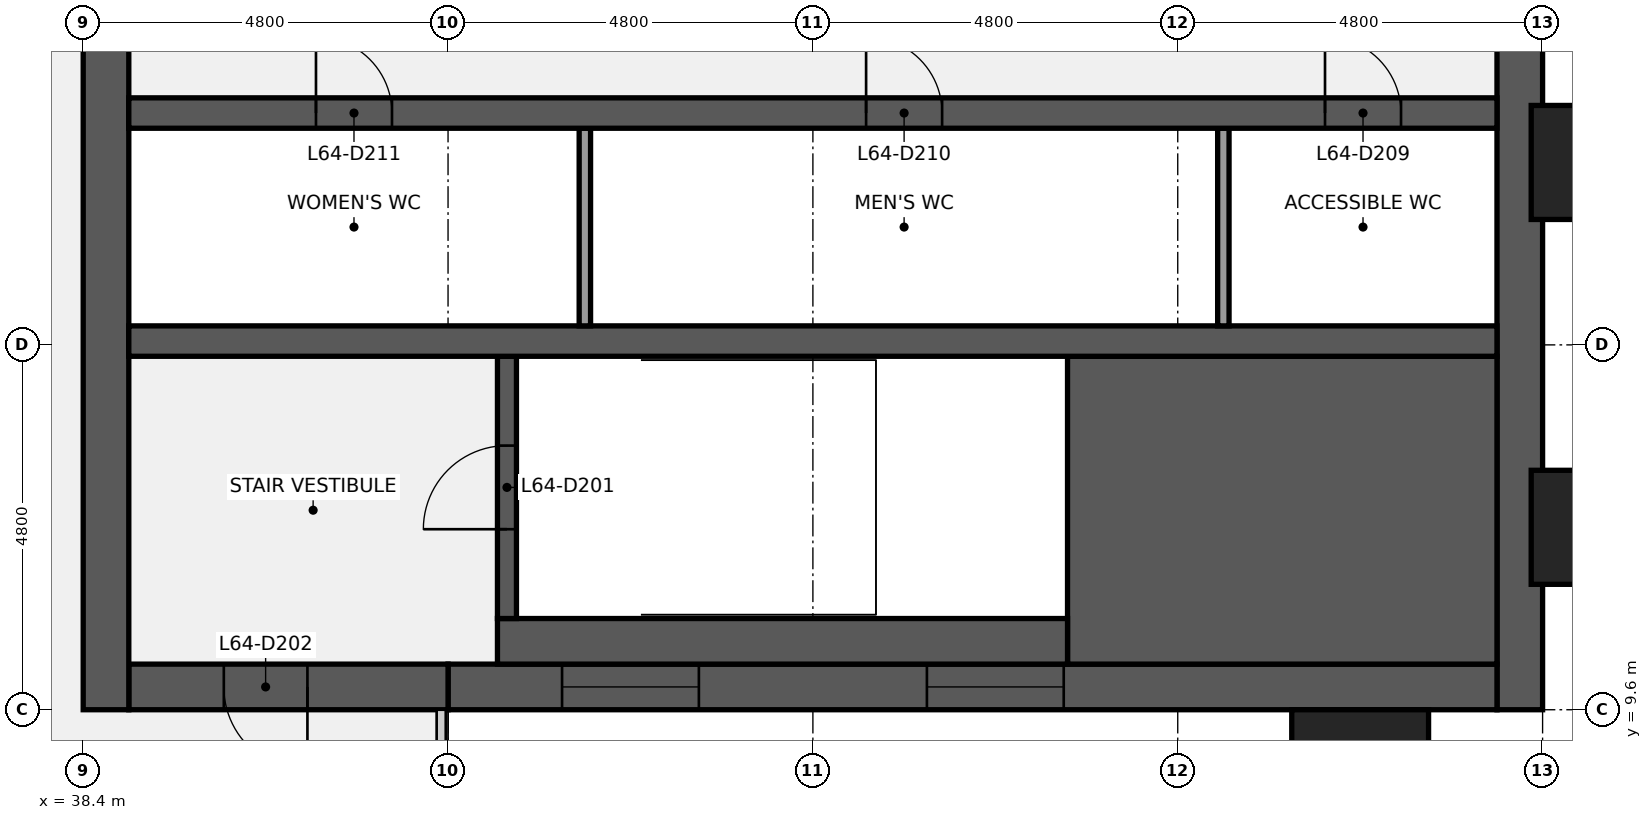
"""IFC4 building model, lengths in metres.
Left out: names, types, materials, properties, quantities, classifications, styles, units other than length and angle.
Written with IfcOpenShell. Run it as: python <this file> out.ifc"""

import sys

from ifc_helpers import new_model, si_unit, direction, frame, frame_2d, origin, origin_2d, place, context, subcontext, project, spatial, rectangle, extrude, element, fill, save


model = new_model("IFC4")
c1 = context("Model", 3, precision=1e-05, world=origin(), true_north=direction((0.0, 1.0)))
c2 = subcontext(c1, "Body", "Model", "MODEL_VIEW")
j1 = project(units=[si_unit("LENGTHUNIT", "METRE"), si_unit("PLANEANGLEUNIT", "RADIAN")], contexts=[c1])
p1 = place(None, origin())
s1 = spatial("IfcSite", under=j1, at=p1, CompositionType="ELEMENT")
p2 = place(p1, origin())
s2 = spatial("IfcBuilding", under=s1, at=p2, CompositionType="ELEMENT")
p3 = place(p2, frame((0.0, 0.0, 294.3)))
s3 = spatial("IfcBuildingStorey", under=s2, at=p3, CompositionType="ELEMENT", Elevation=294.3)
p4 = place(p3, frame((57.3, 38.4, 0.0), z_axis=(0.0, 0.0, 1.0), x_axis=(0.0, -1.0, 0.0)))
e1 = element("IfcWall", 1, at=p4, inside=s3, PredefinedType="SHEAR", context=c2, shape_type="SweptSolid", body=[
    extrude(rectangle(XDim=28.8, YDim=0.6, at=frame_2d((14.4, 0.0))), origin(), (0.0, 0.0, 1.0), 3.84),
])
p5 = place(p4, frame((18.45, 0.0, 0.9)))
e2 = element("IfcOpeningElement", 2, at=p5, cuts=e1, PredefinedType="OPENING", context=c2, shape_type="SweptSolid", body=[
    extrude(rectangle(XDim=1.5, YDim=1.5, at=frame_2d((0.75, 0.75))), frame((0.0, 0.31, 0.0), z_axis=(0.0, -1.0, 0.0), x_axis=(1.0, 0.0, 0.0)), (0.0, 0.0, 1.0), 0.62),
])
p6 = place(p4, frame((8.85, 0.0, 0.9)))
e3 = element("IfcOpeningElement", 3, at=p6, cuts=e1, PredefinedType="OPENING", context=c2, shape_type="SweptSolid", body=[
    extrude(rectangle(XDim=1.5, YDim=1.5, at=frame_2d((0.75, 0.75))), frame((0.0, 0.31, 0.0), z_axis=(0.0, -1.0, 0.0), x_axis=(1.0, 0.0, 0.0)), (0.0, 0.0, 1.0), 0.62),
])
p7 = place(p3, frame((57.0, 9.9, 0.0), z_axis=(0.0, 0.0, 1.0), x_axis=(-1.0, 0.0, 0.0)))
e4 = element("IfcWall", 4, at=p7, inside=s3, PredefinedType="SHEAR", context=c2, shape_type="SweptSolid", body=[
    extrude(rectangle(XDim=13.8, YDim=0.6, at=frame_2d((6.9, 0.0))), origin(), (0.0, 0.0, 1.0), 3.84),
])
p8 = place(p7, frame((5.7, 0.0, 0.9)))
e5 = element("IfcOpeningElement", 5, at=p8, cuts=e4, PredefinedType="OPENING", context=c2, shape_type="SweptSolid", body=[
    extrude(rectangle(XDim=1.8, YDim=1.5, at=frame_2d((0.9, 0.75))), frame((0.0, 0.31, 0.0), z_axis=(0.0, -1.0, 0.0), x_axis=(1.0, 0.0, 0.0)), (0.0, 0.0, 1.0), 0.62),
])
p9 = place(p7, frame((10.5, 0.0, 0.9)))
e6 = element("IfcOpeningElement", 6, at=p9, cuts=e4, PredefinedType="OPENING", context=c2, shape_type="SweptSolid", body=[
    extrude(rectangle(XDim=1.8, YDim=1.5, at=frame_2d((0.9, 0.75))), frame((0.0, 0.31, 0.0), z_axis=(0.0, -1.0, 0.0), x_axis=(1.0, 0.0, 0.0)), (0.0, 0.0, 1.0), 0.62),
])
p10 = place(p3, frame((43.2, 9.9, 0.0), z_axis=(0.0, 0.0, 1.0), x_axis=(-1.0, 0.0, 0.0)))
e7 = element("IfcWall", 7, at=p10, inside=s3, PredefinedType="SHEAR", context=c2, shape_type="SweptSolid", body=[
    extrude(rectangle(XDim=4.2, YDim=0.6, at=frame_2d((2.1, 0.0))), origin(), (0.0, 0.0, 1.0), 3.84),
])
p11 = place(p10, frame((1.85, 0.0, 0.0)))
e8 = element("IfcOpeningElement", 8, at=p11, cuts=e7, PredefinedType="OPENING", context=c2, shape_type="SweptSolid", body=[
    extrude(rectangle(XDim=1.1, YDim=2.1, at=frame_2d((0.55, 1.05))), frame((0.0, 0.31, 0.0), z_axis=(0.0, -1.0, 0.0), x_axis=(1.0, 0.0, 0.0)), (0.0, 0.0, 1.0), 0.62),
])
p12 = place(p3, frame((38.7, 9.6, 0.0), z_axis=(0.0, 0.0, 1.0), x_axis=(0.0, 1.0, 0.0)))
e9 = element("IfcWall", 9, at=p12, inside=s3, PredefinedType="SHEAR", context=c2, shape_type="SweptSolid", body=[
    extrude(rectangle(XDim=28.8, YDim=0.6, at=frame_2d((14.4, 0.0))), origin(), (0.0, 0.0, 1.0), 3.84),
])
p13 = place(p12, frame((8.7, 0.0, 0.0)))
e10 = element("IfcOpeningElement", 10, at=p13, cuts=e9, PredefinedType="OPENING", context=c2, shape_type="SweptSolid", body=[
    extrude(rectangle(XDim=1.8, YDim=2.1, at=frame_2d((0.9, 1.05))), frame((0.0, 0.31, 0.0), z_axis=(0.0, -1.0, 0.0), x_axis=(1.0, 0.0, 0.0)), (0.0, 0.0, 1.0), 0.62),
])
p14 = place(p12, frame((18.3, 0.0, 0.0)))
e11 = element("IfcOpeningElement", 11, at=p14, cuts=e9, PredefinedType="OPENING", context=c2, shape_type="SweptSolid", body=[
    extrude(rectangle(XDim=1.8, YDim=2.1, at=frame_2d((0.9, 1.05))), frame((0.0, 0.31, 0.0), z_axis=(0.0, -1.0, 0.0), x_axis=(1.0, 0.0, 0.0)), (0.0, 0.0, 1.0), 0.62),
])
p15 = place(p3, frame((51.35, 12.225, 0.0), z_axis=(0.0, 0.0, 1.0), x_axis=(1.0, 0.0, 0.0)))
e12 = element("IfcWall", 12, at=p15, inside=s3, PredefinedType="SHEAR", context=c2, shape_type="SweptSolid", body=[
    extrude(rectangle(XDim=5.65, YDim=4.05, at=frame_2d((2.825, 0.0))), origin(), (0.0, 0.0, 1.0), 3.84),
])
p16 = place(p3, frame((43.85, 10.5, 0.0), z_axis=(0.0, 0.0, 1.0), x_axis=(1.0, 0.0, 0.0)))
e13 = element("IfcWall", 13, at=p16, inside=s3, PredefinedType="SHEAR", context=c2, shape_type="SweptSolid", body=[
    extrude(rectangle(XDim=7.5, YDim=0.6, at=frame_2d((3.75, 0.0))), origin(), (0.0, 0.0, 1.0), 3.84),
])
p17 = place(p3, frame((43.975, 10.8, 0.0), z_axis=(0.0, 0.0, 1.0), x_axis=(0.0, 1.0, 0.0)))
e14 = element("IfcWall", 14, at=p17, inside=s3, PredefinedType="SHEAR", context=c2, shape_type="SweptSolid", body=[
    extrude(rectangle(XDim=3.45, YDim=0.25, at=frame_2d((1.725, 0.0))), origin(), (0.0, 0.0, 1.0), 3.84),
])
p18 = place(p17, frame((1.175, 0.0, 0.0)))
e15 = element("IfcOpeningElement", 15, at=p18, cuts=e14, PredefinedType="OPENING", context=c2, shape_type="SweptSolid", body=[
    extrude(rectangle(XDim=1.1, YDim=2.1, at=frame_2d((0.55, 1.05))), frame((0.0, 0.135, 0.0), z_axis=(0.0, -1.0, 0.0), x_axis=(1.0, 0.0, 0.0)), (0.0, 0.0, 1.0), 0.27),
])
p19 = place(p3, frame((39.0, 14.45, 0.0), z_axis=(0.0, 0.0, 1.0), x_axis=(1.0, 0.0, 0.0)))
e16 = element("IfcWall", 16, at=p19, inside=s3, PredefinedType="SHEAR", context=c2, shape_type="SweptSolid", body=[
    extrude(rectangle(XDim=18.0, YDim=0.4, at=frame_2d((9.0, 0.0))), origin(), (0.0, 0.0, 1.0), 3.84),
])
for number, where, z_axis, x_axis in (
    (17, (53.4, 14.65, 0.0), (0.0, 0.0, 1.0), (0.0, 1.0, 0.0)),
    (18, (45.0, 14.65, 0.0), (0.0, 0.0, 1.0), (0.0, 1.0, 0.0)),
):
    element("IfcWall", number, at=place(p3, frame(where, z_axis=z_axis, x_axis=x_axis)), inside=s3, PredefinedType="PARTITIONING", context=c2, shape_type="SweptSolid", body=[
        extrude(rectangle(XDim=2.6, YDim=0.15, at=frame_2d((1.3, 0.0))), origin(), (0.0, 0.0, 1.0), 3.84),
    ])
p20 = place(p3, frame((39.0, 17.45, 0.0), z_axis=(0.0, 0.0, 1.0), x_axis=(1.0, 0.0, 0.0)))
e19 = element("IfcWall", 19, at=p20, inside=s3, PredefinedType="SHEAR", context=c2, shape_type="SweptSolid", body=[
    extrude(rectangle(XDim=18.0, YDim=0.4, at=frame_2d((9.0, 0.0))), origin(), (0.0, 0.0, 1.0), 3.84),
])
p21 = place(p20, frame((15.738, 0.0, 0.0)))
e20 = element("IfcOpeningElement", 20, at=p21, cuts=e19, PredefinedType="OPENING", context=c2, shape_type="SweptSolid", body=[
    extrude(rectangle(XDim=1.0, YDim=2.1, at=frame_2d((0.5, 1.05))), frame((0.0, 0.21, 0.0), z_axis=(0.0, -1.0, 0.0), x_axis=(1.0, 0.0, 0.0)), (0.0, 0.0, 1.0), 0.42),
])
p22 = place(p20, frame((9.7, 0.0, 0.0)))
e21 = element("IfcOpeningElement", 21, at=p22, cuts=e19, PredefinedType="OPENING", context=c2, shape_type="SweptSolid", body=[
    extrude(rectangle(XDim=1.0, YDim=2.1, at=frame_2d((0.5, 1.05))), frame((0.0, 0.21, 0.0), z_axis=(0.0, -1.0, 0.0), x_axis=(1.0, 0.0, 0.0)), (0.0, 0.0, 1.0), 0.42),
])
p23 = place(p20, frame((2.462, 0.0, 0.0)))
e22 = element("IfcOpeningElement", 22, at=p23, cuts=e19, PredefinedType="OPENING", context=c2, shape_type="SweptSolid", body=[
    extrude(rectangle(XDim=1.0, YDim=2.1, at=frame_2d((0.5, 1.05))), frame((0.0, 0.21, 0.0), z_axis=(0.0, -1.0, 0.0), x_axis=(1.0, 0.0, 0.0)), (0.0, 0.0, 1.0), 0.42),
])
for number, where, z_axis, x_axis in (
    (23, (55.2, 8.85, 0.0), (0.0, 0.0, 1.0), (1.0, 0.0, 0.0)),
    (24, (58.35, 12.0, 0.0), (0.0, 0.0, 1.0), (0.0, 1.0, 0.0)),
    (25, (58.35, 16.8, 0.0), (0.0, 0.0, 1.0), (0.0, 1.0, 0.0)),
):
    element("IfcColumn", number, at=place(p3, frame(where, z_axis=z_axis, x_axis=x_axis)), inside=s3, PredefinedType="PILASTER", context=c2, shape_type="SweptSolid", body=[
        extrude(rectangle(XDim=1.8, YDim=1.5, at=origin_2d()), origin(), (0.0, 0.0, 1.0), 4.0),
    ])
p24 = place(p18, origin())
e26 = element("IfcDoor", 26, at=p24, inside=s3, OperationType="SINGLE_SWING_LEFT", PredefinedType="DOOR", context=c2, shape_type="SweptSolid", body=[
    extrude(rectangle(XDim=1.1, YDim=2.1, at=frame_2d((0.55, 1.05))), frame((0.0, 0.025, 0.0), z_axis=(0.0, -1.0, 0.0), x_axis=(1.0, 0.0, 0.0)), (0.0, 0.0, 1.0), 0.05),
])
fill(e15, e26)
p25 = place(p11, origin())
e27 = element("IfcDoor", 27, at=p25, inside=s3, OperationType="SINGLE_SWING_LEFT", PredefinedType="DOOR", context=c2, shape_type="SweptSolid", body=[
    extrude(rectangle(XDim=1.1, YDim=2.1, at=frame_2d((0.55, 1.05))), frame((0.0, 0.025, 0.0), z_axis=(0.0, -1.0, 0.0), x_axis=(1.0, 0.0, 0.0)), (0.0, 0.0, 1.0), 0.05),
])
fill(e8, e27)
p26 = place(p21, origin())
e28 = element("IfcDoor", 28, at=p26, inside=s3, OperationType="SINGLE_SWING_LEFT", PredefinedType="DOOR", context=c2, shape_type="SweptSolid", body=[
    extrude(rectangle(XDim=1.0, YDim=2.1, at=frame_2d((0.5, 1.05))), frame((0.0, 0.025, 0.0), z_axis=(0.0, -1.0, 0.0), x_axis=(1.0, 0.0, 0.0)), (0.0, 0.0, 1.0), 0.05),
])
fill(e20, e28)
p27 = place(p22, origin())
e29 = element("IfcDoor", 29, at=p27, inside=s3, OperationType="SINGLE_SWING_LEFT", PredefinedType="DOOR", context=c2, shape_type="SweptSolid", body=[
    extrude(rectangle(XDim=1.0, YDim=2.1, at=frame_2d((0.5, 1.05))), frame((0.0, 0.025, 0.0), z_axis=(0.0, -1.0, 0.0), x_axis=(1.0, 0.0, 0.0)), (0.0, 0.0, 1.0), 0.05),
])
fill(e21, e29)
p28 = place(p23, origin())
e30 = element("IfcDoor", 30, at=p28, inside=s3, OperationType="SINGLE_SWING_LEFT", PredefinedType="DOOR", context=c2, shape_type="SweptSolid", body=[
    extrude(rectangle(XDim=1.0, YDim=2.1, at=frame_2d((0.5, 1.05))), frame((0.0, 0.025, 0.0), z_axis=(0.0, -1.0, 0.0), x_axis=(1.0, 0.0, 0.0)), (0.0, 0.0, 1.0), 0.05),
])
fill(e22, e30)
p29 = place(p8, origin())
e31 = element("IfcWindow", 31, at=p29, inside=s3, PartitioningType="SINGLE_PANEL", PredefinedType="WINDOW", context=c2, shape_type="SweptSolid", body=[
    extrude(rectangle(XDim=1.8, YDim=1.5, at=frame_2d((0.9, 0.75))), frame((0.0, 0.03, 0.0), z_axis=(0.0, -1.0, 0.0), x_axis=(1.0, 0.0, 0.0)), (0.0, 0.0, 1.0), 0.06),
])
fill(e5, e31)
p30 = place(p9, origin())
e32 = element("IfcWindow", 32, at=p30, inside=s3, PartitioningType="SINGLE_PANEL", PredefinedType="WINDOW", context=c2, shape_type="SweptSolid", body=[
    extrude(rectangle(XDim=1.8, YDim=1.5, at=frame_2d((0.9, 0.75))), frame((0.0, 0.03, 0.0), z_axis=(0.0, -1.0, 0.0), x_axis=(1.0, 0.0, 0.0)), (0.0, 0.0, 1.0), 0.06),
])
fill(e6, e32)
save(model, sys.argv[1])
